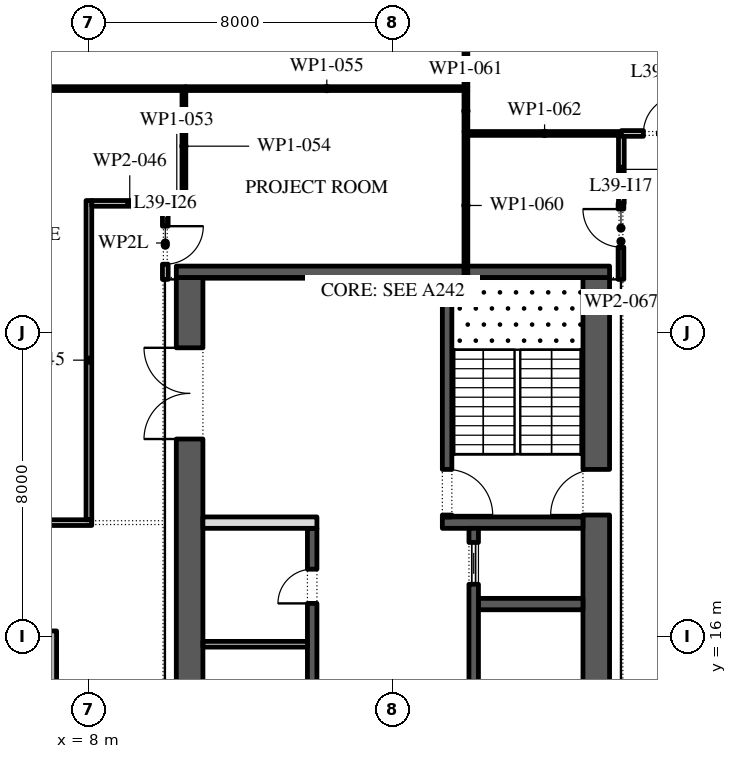
"""IFC4 building model, lengths in metres.
Left out: names, types, materials, properties, quantities, classifications, styles, units other than length and angle.
Written with IfcOpenShell. Run it as: python <this file> out.ifc"""

import sys

from ifc_helpers import new_model, si_unit, direction, frame, frame_2d, origin, place, context, subcontext, project, spatial, polyline, rectangle, outline, extrude, element, fill, save


model = new_model("IFC4")
c1 = context("Model", 3, precision=1e-05, world=origin(), true_north=direction((0.0, 1.0)))
c2 = subcontext(c1, "Body", "Model", "MODEL_VIEW")
j1 = project(units=[si_unit("LENGTHUNIT", "METRE"), si_unit("PLANEANGLEUNIT", "RADIAN")], contexts=[c1])
p1 = place(None, origin())
s1 = spatial("IfcSite", under=j1, at=p1, CompositionType="ELEMENT")
p2 = place(p1, origin())
s2 = spatial("IfcBuilding", under=s1, at=p2, CompositionType="ELEMENT")
p3 = place(p2, frame((0.0, 0.0, 180.0)))
s3 = spatial("IfcBuildingStorey", under=s2, at=p3, CompositionType="ELEMENT", Elevation=180.0)
p4 = place(p3, origin())
e1 = element("IfcWall", 1, at=p4, inside=s3, PredefinedType="STANDARD", context=c2, shape_type="SweptSolid", body=[
    extrude(outline(polyline([(-7.15, -2.15), (7.15, -2.15), (7.15, 16.15), (-7.15, 16.15), (-7.15, -2.15)]), holes=[polyline([(-7.0, -2.0), (-7.0, 16.0), (7.0, 16.0), (7.0, -2.0), (-7.0, -2.0)])]), origin(), (0.0, 0.0, 1.0), 4.0),
])
p5 = place(p3, frame((33.157, -5.092, 0.0), z_axis=(0.0, 0.0, 1.0), x_axis=(-0.224950279389, 0.974370243697, 0.0)))
e2 = element("IfcWall", 2, at=p5, inside=s3, PredefinedType="STANDARD", context=c2, shape_type="SweptSolid", body=[
    extrude(rectangle(XDim=49.5, YDim=0.3, at=frame_2d((24.75, 0.0))), origin(), (0.0, 0.0, 1.0), 4.0),
])
p6 = place(p5, frame((2.207, 0.0, 0.0)))
e3 = element("IfcOpeningElement", 3, at=p6, cuts=e2, PredefinedType="OPENING", context=c2, shape_type="SweptSolid", body=[
    extrude(rectangle(XDim=2.4, YDim=3.125, at=frame_2d((1.2, 1.562))), frame((0.0, 0.16, 0.0), z_axis=(0.0, -1.0, 0.0), x_axis=(1.0, 0.0, 0.0)), (0.0, 0.0, 1.0), 0.32),
])
p7 = place(p5, frame((8.121, 0.0, 0.45)))
e4 = element("IfcOpeningElement", 4, at=p7, cuts=e2, PredefinedType="OPENING", context=c2, shape_type="SweptSolid", body=[
    extrude(rectangle(XDim=4.5, YDim=2.875, at=frame_2d((2.25, 1.438))), frame((0.0, 0.16, 0.0), z_axis=(0.0, -1.0, 0.0), x_axis=(1.0, 0.0, 0.0)), (0.0, 0.0, 1.0), 0.32),
])
p8 = place(p5, frame((15.236, 0.0, 0.45)))
e5 = element("IfcOpeningElement", 5, at=p8, cuts=e2, PredefinedType="OPENING", context=c2, shape_type="SweptSolid", body=[
    extrude(rectangle(XDim=4.5, YDim=2.875, at=frame_2d((2.25, 1.438))), frame((0.0, 0.16, 0.0), z_axis=(0.0, -1.0, 0.0), x_axis=(1.0, 0.0, 0.0)), (0.0, 0.0, 1.0), 0.32),
])
p9 = place(p5, frame((22.35, 0.0, 0.45)))
e6 = element("IfcOpeningElement", 6, at=p9, cuts=e2, PredefinedType="OPENING", context=c2, shape_type="SweptSolid", body=[
    extrude(rectangle(XDim=4.5, YDim=3.0, at=frame_2d((2.25, 1.5))), frame((0.0, 0.16, 0.0), z_axis=(0.0, -1.0, 0.0), x_axis=(1.0, 0.0, 0.0)), (0.0, 0.0, 1.0), 0.32),
])
p10 = place(p5, frame((30.514, 0.0, 0.0)))
e7 = element("IfcOpeningElement", 7, at=p10, cuts=e2, PredefinedType="OPENING", context=c2, shape_type="SweptSolid", body=[
    extrude(rectangle(XDim=2.4, YDim=3.45, at=frame_2d((1.2, 1.725))), frame((0.0, 0.16, 0.0), z_axis=(0.0, -1.0, 0.0), x_axis=(1.0, 0.0, 0.0)), (0.0, 0.0, 1.0), 0.32),
])
p11 = place(p5, frame((36.579, 0.0, 0.45)))
e8 = element("IfcOpeningElement", 8, at=p11, cuts=e2, PredefinedType="OPENING", context=c2, shape_type="SweptSolid", body=[
    extrude(rectangle(XDim=4.5, YDim=3.05, at=frame_2d((2.25, 1.525))), frame((0.0, 0.16, 0.0), z_axis=(0.0, -1.0, 0.0), x_axis=(1.0, 0.0, 0.0)), (0.0, 0.0, 1.0), 0.32),
])
p12 = place(p5, frame((43.693, 0.0, 0.45)))
e9 = element("IfcOpeningElement", 9, at=p12, cuts=e2, PredefinedType="OPENING", context=c2, shape_type="SweptSolid", body=[
    extrude(rectangle(XDim=4.5, YDim=3.05, at=frame_2d((2.25, 1.525))), frame((0.0, 0.16, 0.0), z_axis=(0.0, -1.0, 0.0), x_axis=(1.0, 0.0, 0.0)), (0.0, 0.0, 1.0), 0.32),
])
p13 = place(p3, frame((21.35, -2.45, 0.0), z_axis=(0.0, 0.0, 1.0), x_axis=(0.0, 1.0, 0.0)))
e10 = element("IfcWall", 10, at=p13, inside=s3, PredefinedType="SHEAR", context=c2, shape_type="SweptSolid", body=[
    extrude(rectangle(XDim=27.9, YDim=0.7, at=frame_2d((13.95, 0.0))), origin(), (0.0, 0.0, 1.0), 4.0),
])
p14 = place(p13, frame((5.05, 0.0, 0.0)))
e11 = element("IfcOpeningElement", 11, at=p14, cuts=e10, PredefinedType="OPENING", context=c2, shape_type="SweptSolid", body=[
    extrude(rectangle(XDim=1.2, YDim=2.1, at=frame_2d((0.6, 1.05))), frame((0.0, 0.36, 0.0), z_axis=(0.0, -1.0, 0.0), x_axis=(1.0, 0.0, 0.0)), (0.0, 0.0, 1.0), 0.72),
])
p15 = place(p13, frame((21.65, 0.0, 0.0)))
e12 = element("IfcOpeningElement", 12, at=p15, cuts=e10, PredefinedType="OPENING", context=c2, shape_type="SweptSolid", body=[
    extrude(rectangle(XDim=1.2, YDim=2.1, at=frame_2d((0.6, 1.05))), frame((0.0, 0.36, 0.0), z_axis=(0.0, -1.0, 0.0), x_axis=(1.0, 0.0, 0.0)), (0.0, 0.0, 1.0), 0.72),
])
p16 = place(p3, frame((10.65, -2.45, 0.0), z_axis=(0.0, 0.0, 1.0), x_axis=(0.0, 1.0, 0.0)))
e13 = element("IfcWall", 13, at=p16, inside=s3, PredefinedType="SHEAR", context=c2, shape_type="SweptSolid", body=[
    extrude(rectangle(XDim=27.9, YDim=0.7, at=frame_2d((13.95, 0.0))), origin(), (0.0, 0.0, 1.0), 4.0),
])
p17 = place(p16, frame((23.65, 0.0, 0.0)))
e14 = element("IfcOpeningElement", 14, at=p17, cuts=e13, PredefinedType="OPENING", context=c2, shape_type="SweptSolid", body=[
    extrude(rectangle(XDim=2.4, YDim=2.1, at=frame_2d((1.2, 1.05))), frame((0.0, 0.36, 0.0), z_axis=(0.0, -1.0, 0.0), x_axis=(1.0, 0.0, 0.0)), (0.0, 0.0, 1.0), 0.72),
])
p18 = place(p16, frame((1.087, 0.0, 0.0)))
e15 = element("IfcOpeningElement", 15, at=p18, cuts=e13, PredefinedType="OPENING", context=c2, shape_type="SweptSolid", body=[
    extrude(rectangle(XDim=0.9, YDim=2.1, at=frame_2d((0.45, 1.05))), frame((0.0, 0.36, 0.0), z_axis=(0.0, -1.0, 0.0), x_axis=(1.0, 0.0, 0.0)), (0.0, 0.0, 1.0), 0.72),
])
p19 = place(p16, frame((4.262, 0.0, 0.0)))
e16 = element("IfcOpeningElement", 16, at=p19, cuts=e13, PredefinedType="OPENING", context=c2, shape_type="SweptSolid", body=[
    extrude(rectangle(XDim=1.0, YDim=2.1, at=frame_2d((0.5, 1.05))), frame((0.0, 0.36, 0.0), z_axis=(0.0, -1.0, 0.0), x_axis=(1.0, 0.0, 0.0)), (0.0, 0.0, 1.0), 0.72),
])
p20 = place(p3, frame((10.3, 25.6, 0.0), z_axis=(0.0, 0.0, 1.0), x_axis=(1.0, 0.0, 0.0)))
e17 = element("IfcWall", 17, at=p20, inside=s3, PredefinedType="SHEAR", context=c2, shape_type="SweptSolid", body=[
    extrude(rectangle(XDim=11.4, YDim=0.3, at=frame_2d((5.7, 0.0))), origin(), (0.0, 0.0, 1.0), 4.0),
])
p21 = place(p3, frame((17.3, 19.0, 0.0), z_axis=(0.0, 0.0, 1.0), x_axis=(1.0, 0.0, 0.0)))
e18 = element("IfcWall", 18, at=p21, inside=s3, PredefinedType="SHEAR", context=c2, shape_type="SweptSolid", body=[
    extrude(rectangle(XDim=3.7, YDim=0.3, at=frame_2d((1.85, 0.0))), origin(), (0.0, 0.0, 1.0), 4.0),
])
p22 = place(p3, frame((17.425, 19.15, 0.0), z_axis=(0.0, 0.0, 1.0), x_axis=(0.0, 1.0, 0.0)))
e19 = element("IfcWall", 19, at=p22, inside=s3, PredefinedType="SHEAR", context=c2, shape_type="SweptSolid", body=[
    extrude(rectangle(XDim=6.3, YDim=0.25, at=frame_2d((3.15, 0.0))), origin(), (0.0, 0.0, 1.0), 4.0),
])
p23 = place(p22, frame((0.05, 0.0, 0.0)))
e20 = element("IfcOpeningElement", 20, at=p23, cuts=e19, PredefinedType="OPENING", context=c2, shape_type="SweptSolid", body=[
    extrude(rectangle(XDim=1.2, YDim=2.1, at=frame_2d((0.6, 1.05))), frame((0.0, 0.135, 0.0), z_axis=(0.0, -1.0, 0.0), x_axis=(1.0, 0.0, 0.0)), (0.0, 0.0, 1.0), 0.27),
])
p24 = place(p3, frame((18.25, 16.857, 0.0), z_axis=(0.0, 0.0, 1.0), x_axis=(1.0, 0.0, 0.0)))
e21 = element("IfcWall", 21, at=p24, inside=s3, PredefinedType="SHEAR", context=c2, shape_type="SweptSolid", body=[
    extrude(rectangle(XDim=2.75, YDim=0.3, at=frame_2d((1.375, 0.0))), origin(), (0.0, 0.0, 1.0), 4.0),
])
p25 = place(p3, frame((18.125, 4.15, 0.0), z_axis=(0.0, 0.0, 1.0), x_axis=(0.0, 1.0, 0.0)))
e22 = element("IfcWall", 22, at=p25, inside=s3, PredefinedType="SHEAR", context=c2, shape_type="SweptSolid", body=[
    extrude(rectangle(XDim=14.7, YDim=0.25, at=frame_2d((7.35, 0.0))), origin(), (0.0, 0.0, 1.0), 4.0),
])
p26 = place(p25, frame((3.246, 0.0, 0.0)))
e23 = element("IfcOpeningElement", 23, at=p26, cuts=e22, PredefinedType="OPENING", context=c2, shape_type="SweptSolid", body=[
    extrude(rectangle(XDim=0.9, YDim=2.1, at=frame_2d((0.45, 1.05))), frame((0.0, 0.135, 0.0), z_axis=(0.0, -1.0, 0.0), x_axis=(1.0, 0.0, 0.0)), (0.0, 0.0, 1.0), 0.27),
])
p27 = place(p25, frame((8.454, 0.0, 0.0)))
e24 = element("IfcOpeningElement", 24, at=p27, cuts=e22, PredefinedType="OPENING", context=c2, shape_type="SweptSolid", body=[
    extrude(rectangle(XDim=0.9, YDim=2.1, at=frame_2d((0.45, 1.05))), frame((0.0, 0.135, 0.0), z_axis=(0.0, -1.0, 0.0), x_axis=(1.0, 0.0, 0.0)), (0.0, 0.0, 1.0), 0.27),
])
p28 = place(p25, frame((0.371, 0.0, 0.0)))
e25 = element("IfcOpeningElement", 25, at=p28, cuts=e22, PredefinedType="OPENING", context=c2, shape_type="SweptSolid", body=[
    extrude(rectangle(XDim=1.1, YDim=2.1, at=frame_2d((0.55, 1.05))), frame((0.0, 0.135, 0.0), z_axis=(0.0, -1.0, 0.0), x_axis=(1.0, 0.0, 0.0)), (0.0, 0.0, 1.0), 0.27),
])
p29 = place(p25, frame((13.229, 0.0, 0.0)))
e26 = element("IfcOpeningElement", 26, at=p29, cuts=e22, PredefinedType="OPENING", context=c2, shape_type="SweptSolid", body=[
    extrude(rectangle(XDim=1.1, YDim=2.1, at=frame_2d((0.55, 1.05))), frame((0.0, 0.135, 0.0), z_axis=(0.0, -1.0, 0.0), x_axis=(1.0, 0.0, 0.0)), (0.0, 0.0, 1.0), 0.27),
])
p30 = place(p3, frame((13.875, -2.45, 0.0), z_axis=(0.0, 0.0, 1.0), x_axis=(0.0, 1.0, 0.0)))
e27 = element("IfcWall", 27, at=p30, inside=s3, PredefinedType="SHEAR", context=c2, shape_type="SweptSolid", body=[
    extrude(rectangle(XDim=21.3, YDim=0.25, at=frame_2d((10.65, 0.0))), origin(), (0.0, 0.0, 1.0), 4.0),
])
p31 = place(p30, frame((16.261, 0.0, 0.0)))
e28 = element("IfcOpeningElement", 28, at=p31, cuts=e27, PredefinedType="OPENING", context=c2, shape_type="SweptSolid", body=[
    extrude(rectangle(XDim=0.9, YDim=2.1, at=frame_2d((0.45, 1.05))), frame((0.0, 0.135, 0.0), z_axis=(0.0, -1.0, 0.0), x_axis=(1.0, 0.0, 0.0)), (0.0, 0.0, 1.0), 0.27),
])
p32 = place(p30, frame((19.325, 0.0, 0.0)))
e29 = element("IfcOpeningElement", 29, at=p32, cuts=e27, PredefinedType="OPENING", context=c2, shape_type="SweptSolid", body=[
    extrude(rectangle(XDim=0.9, YDim=2.1, at=frame_2d((0.45, 1.05))), frame((0.0, 0.135, 0.0), z_axis=(0.0, -1.0, 0.0), x_axis=(1.0, 0.0, 0.0)), (0.0, 0.0, 1.0), 0.27),
])
p33 = place(p30, frame((6.971, 0.0, 0.0)))
e30 = element("IfcOpeningElement", 30, at=p33, cuts=e27, PredefinedType="OPENING", context=c2, shape_type="SweptSolid", body=[
    extrude(rectangle(XDim=1.1, YDim=2.1, at=frame_2d((0.55, 1.05))), frame((0.0, 0.135, 0.0), z_axis=(0.0, -1.0, 0.0), x_axis=(1.0, 0.0, 0.0)), (0.0, 0.0, 1.0), 0.27),
])
p34 = place(p30, frame((9.114, 0.0, 0.0)))
e31 = element("IfcOpeningElement", 31, at=p34, cuts=e27, PredefinedType="OPENING", context=c2, shape_type="SweptSolid", body=[
    extrude(rectangle(XDim=1.1, YDim=2.1, at=frame_2d((0.55, 1.05))), frame((0.0, 0.135, 0.0), z_axis=(0.0, -1.0, 0.0), x_axis=(1.0, 0.0, 0.0)), (0.0, 0.0, 1.0), 0.27),
])
p35 = place(p30, frame((11.257, 0.0, 0.0)))
e32 = element("IfcOpeningElement", 32, at=p35, cuts=e27, PredefinedType="OPENING", context=c2, shape_type="SweptSolid", body=[
    extrude(rectangle(XDim=1.1, YDim=2.1, at=frame_2d((0.55, 1.05))), frame((0.0, 0.135, 0.0), z_axis=(0.0, -1.0, 0.0), x_axis=(1.0, 0.0, 0.0)), (0.0, 0.0, 1.0), 0.27),
])
p36 = place(p30, frame((13.4, 0.0, 0.0)))
e33 = element("IfcOpeningElement", 33, at=p36, cuts=e27, PredefinedType="OPENING", context=c2, shape_type="SweptSolid", body=[
    extrude(rectangle(XDim=1.1, YDim=2.1, at=frame_2d((0.55, 1.05))), frame((0.0, 0.135, 0.0), z_axis=(0.0, -1.0, 0.0), x_axis=(1.0, 0.0, 0.0)), (0.0, 0.0, 1.0), 0.27),
])
p37 = place(p3, frame((11.0, 19.0, 0.0), z_axis=(0.0, 0.0, 1.0), x_axis=(1.0, 0.0, 0.0)))
e34 = element("IfcWall", 34, at=p37, inside=s3, PredefinedType="PARTITIONING", context=c2, shape_type="SweptSolid", body=[
    extrude(rectangle(XDim=3.0, YDim=0.3, at=frame_2d((1.5, 0.0))), origin(), (0.0, 0.0, 1.0), 4.0),
])
p38 = place(p3, frame((11.0, 15.8, 0.0), z_axis=(0.0, 0.0, 1.0), x_axis=(1.0, 0.0, 0.0)))
e35 = element("IfcWall", 35, at=p38, inside=s3, PredefinedType="PARTITIONING", context=c2, shape_type="SweptSolid", body=[
    extrude(rectangle(XDim=2.75, YDim=0.15, at=frame_2d((1.375, 0.0))), origin(), (0.0, 0.0, 1.0), 4.0),
])
p39 = place(p3, frame((1.025, 19.0, 0.0), z_axis=(0.0, 0.0, 1.0), x_axis=(1.0, 0.0, 0.0)))
e36 = element("IfcWall", 36, at=p39, inside=s3, PredefinedType="PARTITIONING", context=c2, shape_type="SweptSolid", body=[
    extrude(rectangle(XDim=7.05, YDim=0.15, at=frame_2d((3.525, 0.0))), origin(), (0.0, 0.0, 1.0), 4.0),
])
p40 = place(p3, frame((1.175, 30.42, 0.0), z_axis=(0.0, 0.0, 1.0), x_axis=(1.0, 0.0, 0.0)))
e37 = element("IfcWall", 37, at=p40, inside=s3, PredefinedType="PARTITIONING", context=c2, shape_type="SweptSolid", body=[
    extrude(rectangle(XDim=9.375, YDim=0.1, at=frame_2d((4.688, 0.0))), origin(), (0.0, 0.0, 1.0), 4.0),
])
p41 = place(p3, frame((8.0, 19.075, 0.0), z_axis=(0.0, 0.0, 1.0), x_axis=(0.0, 1.0, 0.0)))
e38 = element("IfcWall", 38, at=p41, inside=s3, PredefinedType="PARTITIONING", context=c2, shape_type="SweptSolid", body=[
    extrude(rectangle(XDim=8.4, YDim=0.15, at=frame_2d((4.2, 0.0))), origin(), (0.0, 0.0, 1.0), 4.0),
])
p42 = place(p3, frame((8.075, 27.4, 0.0), z_axis=(0.0, 0.0, 1.0), x_axis=(1.0, 0.0, 0.0)))
e39 = element("IfcWall", 39, at=p42, inside=s3, PredefinedType="PARTITIONING", context=c2, shape_type="SweptSolid", body=[
    extrude(rectangle(XDim=2.0, YDim=0.15, at=frame_2d((1.0, 0.0))), origin(), (0.0, 0.0, 1.0), 4.0),
])
p43 = place(p3, frame((10.01, 27.315, 0.0), z_axis=(0.0, 0.0, 1.0), x_axis=(0.0, -1.0, 0.0)))
e40 = element("IfcWall", 40, at=p43, inside=s3, PredefinedType="PARTITIONING", context=c2, shape_type="SweptSolid", body=[
    extrude(rectangle(XDim=1.915, YDim=0.15, at=frame_2d((0.958, 0.0))), origin(), (0.0, 0.0, 1.0), 3.02),
])
p44 = place(p43, frame((0.515, 0.0, 0.0)))
e41 = element("IfcOpeningElement", 41, at=p44, cuts=e40, PredefinedType="OPENING", context=c2, shape_type="SweptSolid", body=[
    extrude(rectangle(XDim=1.0, YDim=2.1, at=frame_2d((0.5, 1.05))), frame((0.0, 0.085, 0.0), z_axis=(0.0, -1.0, 0.0), x_axis=(1.0, 0.0, 0.0)), (0.0, 0.0, 1.0), 0.17),
])
p45 = place(p3, frame((10.55, 27.39, 0.0), z_axis=(0.0, 0.0, 1.0), x_axis=(-1.0, 0.0, 0.0)))
e42 = element("IfcWall", 42, at=p45, inside=s3, PredefinedType="PARTITIONING", context=c2, shape_type="SweptSolid", body=[
    extrude(rectangle(XDim=0.475, YDim=0.1, at=frame_2d((0.238, 0.0))), origin(), (0.0, 0.0, 1.0), 4.0),
])
p46 = place(p3, frame((10.5, 30.37, 0.0), z_axis=(0.0, 0.0, 1.0), x_axis=(0.0, -1.0, 0.0)))
e43 = element("IfcWall", 43, at=p46, inside=s3, PredefinedType="PARTITIONING", context=c2, shape_type="SweptSolid", body=[
    extrude(rectangle(XDim=2.93, YDim=0.1, at=frame_2d((1.465, 0.0))), origin(), (0.0, 0.0, 1.0), 4.0),
])
p47 = place(p3, frame((10.55, 30.42, 0.0), z_axis=(0.0, 0.0, 1.0), x_axis=(1.0, 0.0, 0.0)))
e44 = element("IfcWall", 44, at=p47, inside=s3, PredefinedType="PARTITIONING", context=c2, shape_type="SweptSolid", body=[
    extrude(rectangle(XDim=7.42, YDim=0.1, at=frame_2d((3.71, 0.0))), origin(), (0.0, 0.0, 1.0), 4.0),
])
p48 = place(p3, frame((17.92, 25.4, 0.0), z_axis=(0.0, 0.0, 1.0), x_axis=(0.0, 1.0, 0.0)))
e45 = element("IfcWall", 45, at=p48, inside=s3, PredefinedType="PARTITIONING", context=c2, shape_type="SweptSolid", body=[
    extrude(rectangle(XDim=3.89, YDim=0.1, at=frame_2d((1.945, 0.0))), origin(), (0.0, 0.0, 1.0), 4.0),
])
p49 = place(p3, frame((17.92, 29.29, 0.0), z_axis=(0.0, 0.0, 1.0), x_axis=(0.0, 1.0, 0.0)))
e46 = element("IfcWall", 46, at=p49, inside=s3, PredefinedType="PARTITIONING", context=c2, shape_type="SweptSolid", body=[
    extrude(rectangle(XDim=1.08, YDim=0.1, at=frame_2d((0.54, 0.0))), origin(), (0.0, 0.0, 1.0), 4.0),
])
p50 = place(p3, frame((17.97, 29.24, 0.0), z_axis=(0.0, 0.0, 1.0), x_axis=(1.0, 0.0, 0.0)))
e47 = element("IfcWall", 47, at=p50, inside=s3, PredefinedType="PARTITIONING", context=c2, shape_type="SweptSolid", body=[
    extrude(rectangle(XDim=4.04, YDim=0.1, at=frame_2d((2.02, 0.0))), origin(), (0.0, 0.0, 1.0), 4.0),
])
p51 = place(p3, frame((17.92, 30.47, 0.0), z_axis=(0.0, 0.0, 1.0), x_axis=(0.0, 1.0, 0.0)))
e48 = element("IfcWall", 48, at=p51, inside=s3, PredefinedType="PARTITIONING", context=c2, shape_type="SweptSolid", body=[
    extrude(rectangle(XDim=5.48, YDim=0.1, at=frame_2d((2.74, 0.0))), origin(), (0.0, 0.0, 1.0), 4.0),
])
p52 = place(p3, frame((22.0, 25.4, 0.0), z_axis=(0.0, 0.0, 1.0), x_axis=(0.0, 1.0, 0.0)))
e49 = element("IfcWall", 49, at=p52, inside=s3, PredefinedType="PARTITIONING", context=c2, shape_type="SweptSolid", body=[
    extrude(rectangle(XDim=2.0, YDim=0.15, at=frame_2d((1.0, 0.0))), origin(), (0.0, 0.0, 1.0), 4.0),
])
p53 = place(p52, frame((0.85, 0.0, 0.0)))
e50 = element("IfcOpeningElement", 50, at=p53, cuts=e49, PredefinedType="OPENING", context=c2, shape_type="SweptSolid", body=[
    extrude(rectangle(XDim=1.0, YDim=2.1, at=frame_2d((0.5, 1.05))), frame((0.0, 0.085, 0.0), z_axis=(0.0, -1.0, 0.0), x_axis=(1.0, 0.0, 0.0)), (0.0, 0.0, 1.0), 0.17),
])
p54 = place(p3, frame((22.01, 27.4, 0.0), z_axis=(0.0, 0.0, 1.0), x_axis=(0.0, 1.0, 0.0)))
e51 = element("IfcWall", 51, at=p54, inside=s3, PredefinedType="PARTITIONING", context=c2, shape_type="SweptSolid", body=[
    extrude(rectangle(XDim=1.79, YDim=0.15, at=frame_2d((0.895, 0.0))), origin(), (0.0, 0.0, 1.0), 4.0),
])
p55 = place(p3, frame((22.01, 29.24, 0.0), z_axis=(0.0, 0.0, 1.0), x_axis=(1.0, 0.0, 0.0)))
e52 = element("IfcWall", 52, at=p55, inside=s3, PredefinedType="PARTITIONING", context=c2, shape_type="SweptSolid", body=[
    extrude(rectangle(XDim=2.055, YDim=0.15, at=frame_2d((1.027, 0.0))), origin(), (0.0, 0.0, 1.0), 4.0),
])
p56 = place(p55, frame((0.58, 0.0, 0.0)))
e53 = element("IfcOpeningElement", 53, at=p56, cuts=e52, PredefinedType="OPENING", context=c2, shape_type="SweptSolid", body=[
    extrude(rectangle(XDim=1.0, YDim=2.1, at=frame_2d((0.5, 1.05))), frame((0.0, 0.085, 0.0), z_axis=(0.0, -1.0, 0.0), x_axis=(1.0, 0.0, 0.0)), (0.0, 0.0, 1.0), 0.17),
])
p57 = place(p29, origin())
e54 = element("IfcDoor", 54, at=p57, inside=s3, OperationType="SLIDING_TO_LEFT", PredefinedType="DOOR", context=c2, shape_type="SweptSolid", body=[
    extrude(rectangle(XDim=1.1, YDim=2.1, at=frame_2d((0.55, 1.05))), frame((0.0, 0.025, 0.0), z_axis=(0.0, -1.0, 0.0), x_axis=(1.0, 0.0, 0.0)), (0.0, 0.0, 1.0), 0.05),
])
fill(e26, e54)
p58 = place(p32, origin())
e55 = element("IfcDoor", 55, at=p58, inside=s3, OperationType="SINGLE_SWING_RIGHT", PredefinedType="DOOR", context=c2, shape_type="SweptSolid", body=[
    extrude(rectangle(XDim=0.9, YDim=2.1, at=frame_2d((0.45, 1.05))), frame((0.0, 0.125, 0.0), z_axis=(0.0, -1.0, 0.0), x_axis=(1.0, 0.0, 0.0)), (0.0, 0.0, 1.0), 0.05),
])
fill(e29, e55)
p59 = place(p17, origin())
e56 = element("IfcDoor", 56, at=p59, inside=s3, OperationType="DOUBLE_DOOR_SINGLE_SWING", PredefinedType="DOOR", context=c2, shape_type="SweptSolid", body=[
    extrude(rectangle(XDim=2.4, YDim=2.1, at=frame_2d((1.2, 1.05))), frame((0.0, 0.025, 0.0), z_axis=(0.0, -1.0, 0.0), x_axis=(1.0, 0.0, 0.0)), (0.0, 0.0, 1.0), 0.05),
])
fill(e14, e56)
p60 = place(p23, frame((1.2, 0.0, 0.0), z_axis=(0.0, 0.0, 1.0), x_axis=(-1.0, 0.0, 0.0)))
e57 = element("IfcDoor", 57, at=p60, inside=s3, OperationType="SINGLE_SWING_LEFT", PredefinedType="DOOR", context=c2, shape_type="SweptSolid", body=[
    extrude(rectangle(XDim=1.2, YDim=2.1, at=frame_2d((0.6, 1.05))), frame((0.0, 0.025, 0.0), z_axis=(0.0, -1.0, 0.0), x_axis=(1.0, 0.0, 0.0)), (0.0, 0.0, 1.0), 0.05),
])
fill(e20, e57)
p61 = place(p15, origin())
e58 = element("IfcDoor", 58, at=p61, inside=s3, OperationType="SINGLE_SWING_RIGHT", PredefinedType="DOOR", context=c2, shape_type="SweptSolid", body=[
    extrude(rectangle(XDim=1.2, YDim=2.1, at=frame_2d((0.6, 1.05))), frame((0.0, 0.025, 0.0), z_axis=(0.0, -1.0, 0.0), x_axis=(1.0, 0.0, 0.0)), (0.0, 0.0, 1.0), 0.05),
])
fill(e12, e58)
p62 = place(p53, origin())
e59 = element("IfcDoor", 59, at=p62, inside=s3, OperationType="SINGLE_SWING_LEFT", PredefinedType="DOOR", context=c2, shape_type="SweptSolid", body=[
    extrude(rectangle(XDim=1.0, YDim=2.1, at=frame_2d((0.5, 1.05))), frame((0.0, 0.025, 0.0), z_axis=(0.0, -1.0, 0.0), x_axis=(1.0, 0.0, 0.0)), (0.0, 0.0, 1.0), 0.05),
])
fill(e50, e59)
p63 = place(p56, origin())
e60 = element("IfcDoor", 60, at=p63, inside=s3, OperationType="SINGLE_SWING_LEFT", PredefinedType="DOOR", context=c2, shape_type="SweptSolid", body=[
    extrude(rectangle(XDim=1.0, YDim=2.1, at=frame_2d((0.5, 1.05))), frame((0.0, 0.025, 0.0), z_axis=(0.0, -1.0, 0.0), x_axis=(1.0, 0.0, 0.0)), (0.0, 0.0, 1.0), 0.05),
])
fill(e53, e60)
p64 = place(p44, origin())
e61 = element("IfcDoor", 61, at=p64, inside=s3, OperationType="SINGLE_SWING_RIGHT", PredefinedType="DOOR", context=c2, shape_type="SweptSolid", body=[
    extrude(rectangle(XDim=1.0, YDim=2.1, at=frame_2d((0.5, 1.05))), frame((0.0, 0.025, 0.0), z_axis=(0.0, -1.0, 0.0), x_axis=(1.0, 0.0, 0.0)), (0.0, 0.0, 1.0), 0.05),
])
fill(e41, e61)
save(model, sys.argv[1])
